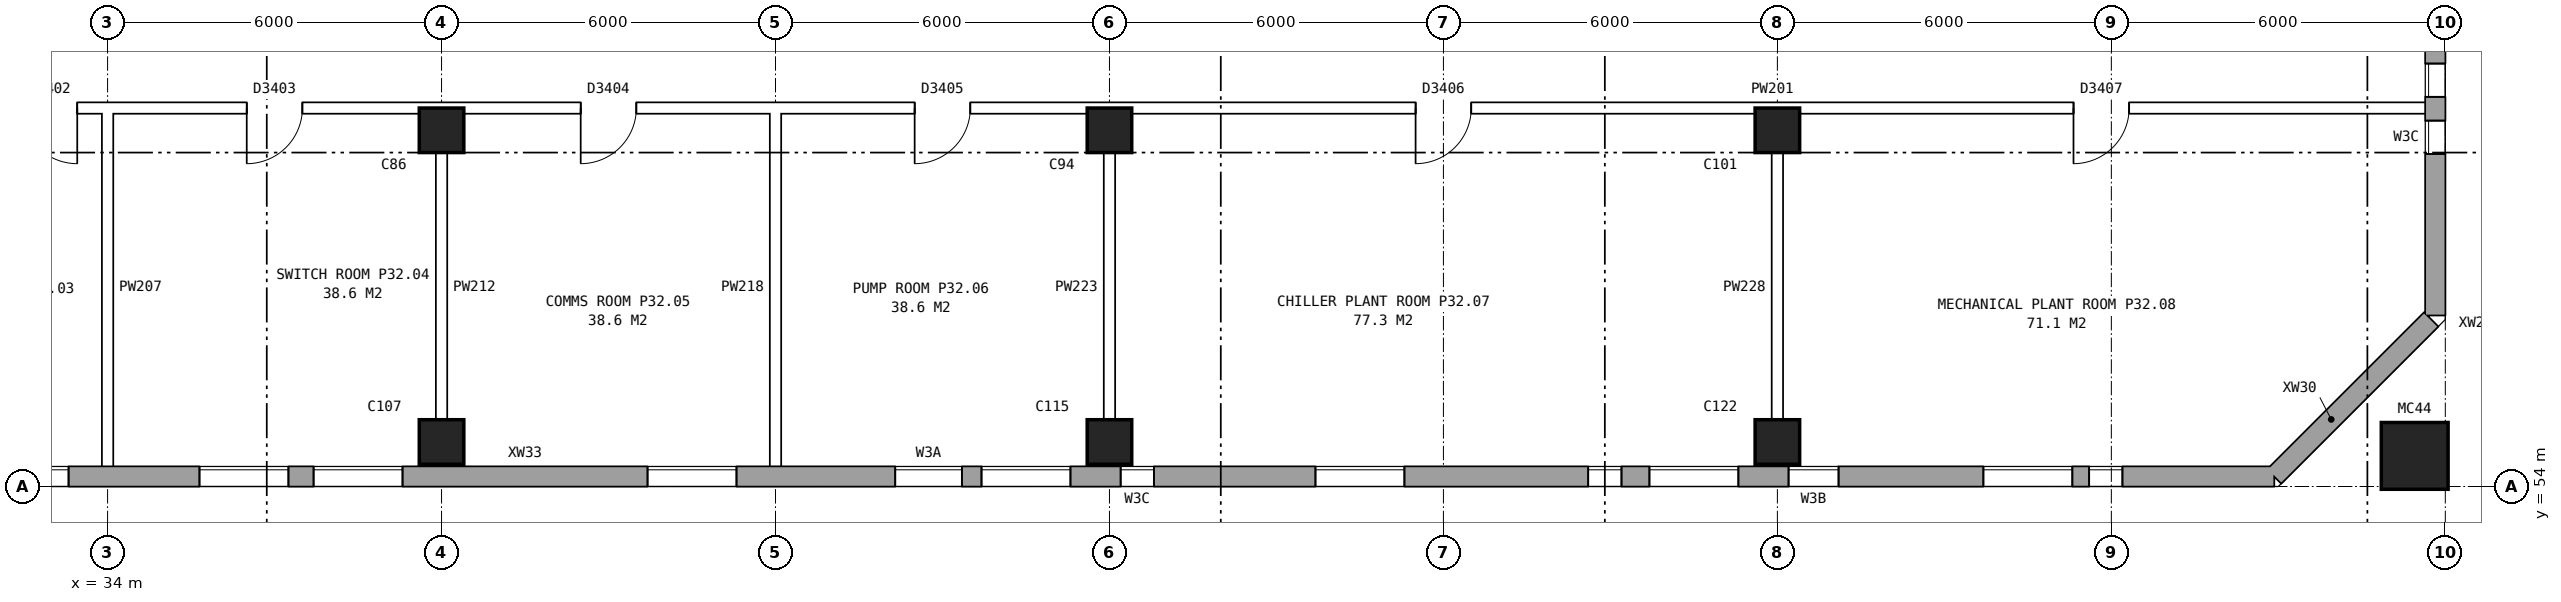
"""IFC4 building model, lengths in metres.
Left out: names, types, materials, properties, quantities, classifications, styles, units other than length and angle.
Written with IfcOpenShell. Run it as: python <this file> out.ifc"""

import sys

from ifc_helpers import new_model, si_unit, direction, frame, frame_2d, origin, origin_2d, place, context, subcontext, project, spatial, rectangle, hollow_rectangle, extrude, element, fill, save


model = new_model("IFC4")
c1 = context("Model", 3, precision=1e-05, world=origin(), true_north=direction((0.0, 1.0)))
c2 = subcontext(c1, "Body", "Model", "MODEL_VIEW")
j1 = project(units=[si_unit("LENGTHUNIT", "METRE"), si_unit("PLANEANGLEUNIT", "RADIAN")], contexts=[c1])
p1 = place(None, origin())
s1 = spatial("IfcSite", under=j1, at=p1, CompositionType="ELEMENT")
p2 = place(p1, origin())
s2 = spatial("IfcBuilding", under=s1, at=p2, CompositionType="ELEMENT")
p3 = place(p2, frame((0.0, 0.0, 115.0)))
s3 = spatial("IfcBuildingStorey", under=s2, at=p3, CompositionType="ELEMENT", Elevation=115.0)
for number, where, z_axis, x_axis in (
    (1, (40.0, 54.8, 0.0), (0.0, 0.0, 1.0), (1.0, 0.0, 0.0)),
    (2, (40.0, 60.4, 0.0), (0.0, 0.0, 1.0), (1.0, 0.0, 0.0)),
    (3, (52.0, 54.8, 0.0), (0.0, 0.0, 1.0), (1.0, 0.0, 0.0)),
    (4, (52.0, 60.4, 0.0), (0.0, 0.0, 1.0), (1.0, 0.0, 0.0)),
    (5, (64.0, 54.8, 0.0), (0.0, 0.0, 1.0), (1.0, 0.0, 0.0)),
    (6, (64.0, 60.4, 0.0), (0.0, 0.0, 1.0), (1.0, 0.0, 0.0)),
):
    element("IfcColumn", number, at=place(p3, frame(where, z_axis=z_axis, x_axis=x_axis)), inside=s3, PredefinedType="COLUMN", context=c2, shape_type="SweptSolid", body=[
        extrude(rectangle(XDim=0.8, YDim=0.8, at=origin_2d()), origin(), (0.0, 0.0, 1.0), 4.2),
    ])
p4 = place(p3, frame((75.45, 54.55, 0.0), z_axis=(0.0, 0.0, 1.0), x_axis=(1.0, 0.0, 0.0)))
e7 = element("IfcColumn", 7, at=p4, inside=s3, PredefinedType="COLUMN", context=c2, shape_type="SweptSolid", body=[
    extrude(hollow_rectangle(XDim=1.2, YDim=1.2, WallThickness=0.065, at=origin_2d()), origin(), (0.0, 0.0, 1.0), 4.5),
])
p5 = place(p3, frame((29.825, 54.18, 0.0), z_axis=(0.0, 0.0, 1.0), x_axis=(1.0, 0.0, 0.0)))
e8 = element("IfcWall", 8, at=p5, inside=s3, PredefinedType="STANDARD", context=c2, shape_type="SweptSolid", body=[
    extrude(rectangle(XDim=43.101, YDim=0.36, at=frame_2d((21.55, 0.0))), origin(), (0.0, 0.0, 1.0), 4.2),
])
p6 = place(p5, frame((1.875, 0.0, 1.5)))
e9 = element("IfcOpeningElement", 9, at=p6, cuts=e8, PredefinedType="OPENING", context=c2, shape_type="SweptSolid", body=[
    extrude(rectangle(XDim=1.6, YDim=1.2, at=frame_2d((0.8, 0.6))), frame((0.0, 0.19, 0.0), z_axis=(0.0, -1.0, 0.0), x_axis=(1.0, 0.0, 0.0)), (0.0, 0.0, 1.0), 0.38),
])
p7 = place(p5, frame((5.825, 0.0, 1.5)))
e10 = element("IfcOpeningElement", 10, at=p7, cuts=e8, PredefinedType="OPENING", context=c2, shape_type="SweptSolid", body=[
    extrude(rectangle(XDim=1.6, YDim=1.2, at=frame_2d((0.8, 0.6))), frame((0.0, 0.19, 0.0), z_axis=(0.0, -1.0, 0.0), x_axis=(1.0, 0.0, 0.0)), (0.0, 0.0, 1.0), 0.38),
])
p8 = place(p5, frame((7.875, 0.0, 1.5)))
e11 = element("IfcOpeningElement", 11, at=p8, cuts=e8, PredefinedType="OPENING", context=c2, shape_type="SweptSolid", body=[
    extrude(rectangle(XDim=1.6, YDim=1.2, at=frame_2d((0.8, 0.6))), frame((0.0, 0.19, 0.0), z_axis=(0.0, -1.0, 0.0), x_axis=(1.0, 0.0, 0.0)), (0.0, 0.0, 1.0), 0.38),
])
p9 = place(p5, frame((13.875, 0.0, 1.5)))
e12 = element("IfcOpeningElement", 12, at=p9, cuts=e8, PredefinedType="OPENING", context=c2, shape_type="SweptSolid", body=[
    extrude(rectangle(XDim=1.6, YDim=1.2, at=frame_2d((0.8, 0.6))), frame((0.0, 0.19, 0.0), z_axis=(0.0, -1.0, 0.0), x_axis=(1.0, 0.0, 0.0)), (0.0, 0.0, 1.0), 0.38),
])
p10 = place(p5, frame((18.325, 0.0, 1.5)))
e13 = element("IfcOpeningElement", 13, at=p10, cuts=e8, PredefinedType="OPENING", context=c2, shape_type="SweptSolid", body=[
    extrude(rectangle(XDim=1.2, YDim=1.2, at=frame_2d((0.6, 0.6))), frame((0.0, 0.19, 0.0), z_axis=(0.0, -1.0, 0.0), x_axis=(1.0, 0.0, 0.0)), (0.0, 0.0, 1.0), 0.38),
])
p11 = place(p5, frame((19.875, 0.0, 1.5)))
e14 = element("IfcOpeningElement", 14, at=p11, cuts=e8, PredefinedType="OPENING", context=c2, shape_type="SweptSolid", body=[
    extrude(rectangle(XDim=1.6, YDim=1.2, at=frame_2d((0.8, 0.6))), frame((0.0, 0.19, 0.0), z_axis=(0.0, -1.0, 0.0), x_axis=(1.0, 0.0, 0.0)), (0.0, 0.0, 1.0), 0.38),
])
p12 = place(p5, frame((22.375, 0.0, 1.5)))
e15 = element("IfcOpeningElement", 15, at=p12, cuts=e8, PredefinedType="OPENING", context=c2, shape_type="SweptSolid", body=[
    extrude(rectangle(XDim=0.6, YDim=1.2, at=frame_2d((0.3, 0.6))), frame((0.0, 0.19, 0.0), z_axis=(0.0, -1.0, 0.0), x_axis=(1.0, 0.0, 0.0)), (0.0, 0.0, 1.0), 0.38),
])
p13 = place(p5, frame((25.875, 0.0, 1.5)))
e16 = element("IfcOpeningElement", 16, at=p13, cuts=e8, PredefinedType="OPENING", context=c2, shape_type="SweptSolid", body=[
    extrude(rectangle(XDim=1.6, YDim=1.2, at=frame_2d((0.8, 0.6))), frame((0.0, 0.19, 0.0), z_axis=(0.0, -1.0, 0.0), x_axis=(1.0, 0.0, 0.0)), (0.0, 0.0, 1.0), 0.38),
])
p14 = place(p5, frame((30.775, 0.0, 1.5)))
e17 = element("IfcOpeningElement", 17, at=p14, cuts=e8, PredefinedType="OPENING", context=c2, shape_type="SweptSolid", body=[
    extrude(rectangle(XDim=0.6, YDim=1.2, at=frame_2d((0.3, 0.6))), frame((0.0, 0.19, 0.0), z_axis=(0.0, -1.0, 0.0), x_axis=(1.0, 0.0, 0.0)), (0.0, 0.0, 1.0), 0.38),
])
p15 = place(p5, frame((31.875, 0.0, 1.5)))
e18 = element("IfcOpeningElement", 18, at=p15, cuts=e8, PredefinedType="OPENING", context=c2, shape_type="SweptSolid", body=[
    extrude(rectangle(XDim=1.6, YDim=1.2, at=frame_2d((0.8, 0.6))), frame((0.0, 0.19, 0.0), z_axis=(0.0, -1.0, 0.0), x_axis=(1.0, 0.0, 0.0)), (0.0, 0.0, 1.0), 0.38),
])
p16 = place(p5, frame((34.375, 0.0, 1.5)))
e19 = element("IfcOpeningElement", 19, at=p16, cuts=e8, PredefinedType="OPENING", context=c2, shape_type="SweptSolid", body=[
    extrude(rectangle(XDim=0.9, YDim=1.2, at=frame_2d((0.45, 0.6))), frame((0.0, 0.19, 0.0), z_axis=(0.0, -1.0, 0.0), x_axis=(1.0, 0.0, 0.0)), (0.0, 0.0, 1.0), 0.38),
])
p17 = place(p5, frame((37.875, 0.0, 1.5)))
e20 = element("IfcOpeningElement", 20, at=p17, cuts=e8, PredefinedType="OPENING", context=c2, shape_type="SweptSolid", body=[
    extrude(rectangle(XDim=1.6, YDim=1.2, at=frame_2d((0.8, 0.6))), frame((0.0, 0.19, 0.0), z_axis=(0.0, -1.0, 0.0), x_axis=(1.0, 0.0, 0.0)), (0.0, 0.0, 1.0), 0.38),
])
p18 = place(p5, frame((39.775, 0.0, 1.5)))
e21 = element("IfcOpeningElement", 21, at=p18, cuts=e8, PredefinedType="OPENING", context=c2, shape_type="SweptSolid", body=[
    extrude(rectangle(XDim=0.6, YDim=1.2, at=frame_2d((0.3, 0.6))), frame((0.0, 0.19, 0.0), z_axis=(0.0, -1.0, 0.0), x_axis=(1.0, 0.0, 0.0)), (0.0, 0.0, 1.0), 0.38),
])
p19 = place(p3, frame((72.925, 54.18, 0.0), z_axis=(0.0, 0.0, 1.0), x_axis=(0.707148882153, 0.707064677713, 0.0)))
e22 = element("IfcWall", 22, at=p19, inside=s3, PredefinedType="STANDARD", context=c2, shape_type="SweptSolid", body=[
    extrude(rectangle(XDim=2.899, YDim=0.36, at=frame_2d((1.45, 0.0))), origin(), (0.0, 0.0, 1.0), 4.2),
])
p20 = place(p3, frame((74.976, 56.23, 0.953), z_axis=(0.0, 0.0, 1.0), x_axis=(0.706994764273, 0.707218780358, 0.0)))
e23 = element("IfcWall", 23, at=p20, inside=s3, PredefinedType="STANDARD", context=c2, shape_type="SweptSolid", body=[
    extrude(rectangle(XDim=1.09, YDim=0.36, at=frame_2d((0.545, 0.0))), origin(), (0.0, 0.0, 1.0), 2.444),
])
p21 = place(p3, frame((75.82, 57.075, 0.0), z_axis=(0.0, 0.0, 1.0), x_axis=(0.0, 1.0, 0.0)))
e24 = element("IfcWall", 24, at=p21, inside=s3, PredefinedType="STANDARD", context=c2, shape_type="SweptSolid", body=[
    extrude(rectangle(XDim=25.851, YDim=0.36, at=frame_2d((12.925, 0.0))), origin(), (0.0, 0.0, 1.0), 4.2),
])
p22 = place(p21, frame((2.9, 0.0, 1.5)))
e25 = element("IfcOpeningElement", 25, at=p22, cuts=e24, PredefinedType="OPENING", context=c2, shape_type="SweptSolid", body=[
    extrude(rectangle(XDim=0.6, YDim=1.2, at=frame_2d((0.3, 0.6))), frame((0.0, 0.19, 0.0), z_axis=(0.0, -1.0, 0.0), x_axis=(1.0, 0.0, 0.0)), (0.0, 0.0, 1.0), 0.38),
])
p23 = place(p21, frame((3.925, 0.0, 1.5)))
e26 = element("IfcOpeningElement", 26, at=p23, cuts=e24, PredefinedType="OPENING", context=c2, shape_type="SweptSolid", body=[
    extrude(rectangle(XDim=0.6, YDim=1.2, at=frame_2d((0.3, 0.6))), frame((0.0, 0.19, 0.0), z_axis=(0.0, -1.0, 0.0), x_axis=(1.0, 0.0, 0.0)), (0.0, 0.0, 1.0), 0.38),
])
p24 = place(p21, frame((19.625, 0.0, 1.5)))
e27 = element("IfcOpeningElement", 27, at=p24, cuts=e24, PredefinedType="OPENING", context=c2, shape_type="SweptSolid", body=[
    extrude(rectangle(XDim=1.6, YDim=1.2, at=frame_2d((0.8, 0.6))), frame((0.0, 0.19, 0.0), z_axis=(0.0, -1.0, 0.0), x_axis=(1.0, 0.0, 0.0)), (0.0, 0.0, 1.0), 0.38),
])
p25 = place(p21, frame((22.125, 0.0, 1.5)))
e28 = element("IfcOpeningElement", 28, at=p25, cuts=e24, PredefinedType="OPENING", context=c2, shape_type="SweptSolid", body=[
    extrude(rectangle(XDim=0.6, YDim=1.2, at=frame_2d((0.3, 0.6))), frame((0.0, 0.19, 0.0), z_axis=(0.0, -1.0, 0.0), x_axis=(1.0, 0.0, 0.0)), (0.0, 0.0, 1.0), 0.38),
])
p26 = place(p3, frame((26.99, 60.8, 0.0), z_axis=(0.0, 0.0, 1.0), x_axis=(1.0, 0.0, 0.0)))
e29 = element("IfcWall", 29, at=p26, inside=s3, PredefinedType="PARTITIONING", context=c2, shape_type="SweptSolid", body=[
    extrude(rectangle(XDim=48.77, YDim=0.2, at=frame_2d((24.385, 0.0))), origin(), (0.0, 0.0, 1.0), 4.2),
])
p27 = place(p26, frame((5.465, 0.0, 0.0)))
e30 = element("IfcOpeningElement", 30, at=p27, cuts=e29, PredefinedType="OPENING", context=c2, shape_type="SweptSolid", body=[
    extrude(rectangle(XDim=1.0, YDim=2.1, at=frame_2d((0.5, 1.05))), frame((0.0, 0.11, 0.0), z_axis=(0.0, -1.0, 0.0), x_axis=(1.0, 0.0, 0.0)), (0.0, 0.0, 1.0), 0.22),
])
p28 = place(p26, frame((9.51, 0.0, 0.0)))
e31 = element("IfcOpeningElement", 31, at=p28, cuts=e29, PredefinedType="OPENING", context=c2, shape_type="SweptSolid", body=[
    extrude(rectangle(XDim=1.0, YDim=2.1, at=frame_2d((0.5, 1.05))), frame((0.0, 0.11, 0.0), z_axis=(0.0, -1.0, 0.0), x_axis=(1.0, 0.0, 0.0)), (0.0, 0.0, 1.0), 0.22),
])
p29 = place(p26, frame((15.51, 0.0, 0.0)))
e32 = element("IfcOpeningElement", 32, at=p29, cuts=e29, PredefinedType="OPENING", context=c2, shape_type="SweptSolid", body=[
    extrude(rectangle(XDim=1.0, YDim=2.1, at=frame_2d((0.5, 1.05))), frame((0.0, 0.11, 0.0), z_axis=(0.0, -1.0, 0.0), x_axis=(1.0, 0.0, 0.0)), (0.0, 0.0, 1.0), 0.22),
])
p30 = place(p26, frame((21.51, 0.0, 0.0)))
e33 = element("IfcOpeningElement", 33, at=p30, cuts=e29, PredefinedType="OPENING", context=c2, shape_type="SweptSolid", body=[
    extrude(rectangle(XDim=1.0, YDim=2.1, at=frame_2d((0.5, 1.05))), frame((0.0, 0.11, 0.0), z_axis=(0.0, -1.0, 0.0), x_axis=(1.0, 0.0, 0.0)), (0.0, 0.0, 1.0), 0.22),
])
p31 = place(p26, frame((30.51, 0.0, 0.0)))
e34 = element("IfcOpeningElement", 34, at=p31, cuts=e29, PredefinedType="OPENING", context=c2, shape_type="SweptSolid", body=[
    extrude(rectangle(XDim=1.0, YDim=2.1, at=frame_2d((0.5, 1.05))), frame((0.0, 0.11, 0.0), z_axis=(0.0, -1.0, 0.0), x_axis=(1.0, 0.0, 0.0)), (0.0, 0.0, 1.0), 0.22),
])
p32 = place(p26, frame((42.33, 0.0, 0.0)))
e35 = element("IfcOpeningElement", 35, at=p32, cuts=e29, PredefinedType="OPENING", context=c2, shape_type="SweptSolid", body=[
    extrude(rectangle(XDim=1.0, YDim=2.1, at=frame_2d((0.5, 1.05))), frame((0.0, 0.11, 0.0), z_axis=(0.0, -1.0, 0.0), x_axis=(1.0, 0.0, 0.0)), (0.0, 0.0, 1.0), 0.22),
])
for number, where, z_axis, x_axis in (
    (36, (34.0, 54.24, 0.0), (0.0, 0.0, 1.0), (0.0, 1.0, 0.0)),
    (37, (40.0, 54.24, 0.0), (0.0, 0.0, 1.0), (0.0, 1.0, 0.0)),
    (38, (46.0, 54.24, 0.0), (0.0, 0.0, 1.0), (0.0, 1.0, 0.0)),
    (39, (52.0, 54.24, 0.0), (0.0, 0.0, 1.0), (0.0, 1.0, 0.0)),
    (40, (64.0, 54.24, 0.0), (0.0, 0.0, 1.0), (0.0, 1.0, 0.0)),
):
    element("IfcWall", number, at=place(p3, frame(where, z_axis=z_axis, x_axis=x_axis)), inside=s3, PredefinedType="PARTITIONING", context=c2, shape_type="SweptSolid", body=[
        extrude(rectangle(XDim=6.66, YDim=0.2, at=frame_2d((3.33, 0.0))), origin(), (0.0, 0.0, 1.0), 4.2),
    ])
p33 = place(p6, origin())
e41 = element("IfcWindow", 41, at=p33, inside=s3, PartitioningType="DOUBLE_PANEL_HORIZONTAL", PredefinedType="WINDOW", context=c2, shape_type="SweptSolid", body=[
    extrude(rectangle(XDim=1.6, YDim=1.2, at=frame_2d((0.8, 0.6))), frame((0.0, 0.15, 0.0), z_axis=(0.0, -1.0, 0.0), x_axis=(1.0, 0.0, 0.0)), (0.0, 0.0, 1.0), 0.06),
])
fill(e9, e41)
p34 = place(p7, origin())
e42 = element("IfcWindow", 42, at=p34, inside=s3, PartitioningType="DOUBLE_PANEL_HORIZONTAL", PredefinedType="WINDOW", context=c2, shape_type="SweptSolid", body=[
    extrude(rectangle(XDim=1.6, YDim=1.2, at=frame_2d((0.8, 0.6))), frame((0.0, 0.15, 0.0), z_axis=(0.0, -1.0, 0.0), x_axis=(1.0, 0.0, 0.0)), (0.0, 0.0, 1.0), 0.06),
])
fill(e10, e42)
p35 = place(p8, origin())
e43 = element("IfcWindow", 43, at=p35, inside=s3, PartitioningType="DOUBLE_PANEL_HORIZONTAL", PredefinedType="WINDOW", context=c2, shape_type="SweptSolid", body=[
    extrude(rectangle(XDim=1.6, YDim=1.2, at=frame_2d((0.8, 0.6))), frame((0.0, 0.15, 0.0), z_axis=(0.0, -1.0, 0.0), x_axis=(1.0, 0.0, 0.0)), (0.0, 0.0, 1.0), 0.06),
])
fill(e11, e43)
p36 = place(p9, origin())
e44 = element("IfcWindow", 44, at=p36, inside=s3, PartitioningType="DOUBLE_PANEL_HORIZONTAL", PredefinedType="WINDOW", context=c2, shape_type="SweptSolid", body=[
    extrude(rectangle(XDim=1.6, YDim=1.2, at=frame_2d((0.8, 0.6))), frame((0.0, 0.15, 0.0), z_axis=(0.0, -1.0, 0.0), x_axis=(1.0, 0.0, 0.0)), (0.0, 0.0, 1.0), 0.06),
])
fill(e12, e44)
p37 = place(p10, origin())
e45 = element("IfcWindow", 45, at=p37, inside=s3, PartitioningType="DOUBLE_PANEL_HORIZONTAL", PredefinedType="WINDOW", context=c2, shape_type="SweptSolid", body=[
    extrude(rectangle(XDim=1.2, YDim=1.2, at=frame_2d((0.6, 0.6))), frame((0.0, 0.15, 0.0), z_axis=(0.0, -1.0, 0.0), x_axis=(1.0, 0.0, 0.0)), (0.0, 0.0, 1.0), 0.06),
])
fill(e13, e45)
p38 = place(p11, origin())
e46 = element("IfcWindow", 46, at=p38, inside=s3, PartitioningType="DOUBLE_PANEL_HORIZONTAL", PredefinedType="WINDOW", context=c2, shape_type="SweptSolid", body=[
    extrude(rectangle(XDim=1.6, YDim=1.2, at=frame_2d((0.8, 0.6))), frame((0.0, 0.15, 0.0), z_axis=(0.0, -1.0, 0.0), x_axis=(1.0, 0.0, 0.0)), (0.0, 0.0, 1.0), 0.06),
])
fill(e14, e46)
p39 = place(p12, origin())
e47 = element("IfcWindow", 47, at=p39, inside=s3, PartitioningType="DOUBLE_PANEL_HORIZONTAL", PredefinedType="WINDOW", context=c2, shape_type="SweptSolid", body=[
    extrude(rectangle(XDim=0.6, YDim=1.2, at=frame_2d((0.3, 0.6))), frame((0.0, 0.15, 0.0), z_axis=(0.0, -1.0, 0.0), x_axis=(1.0, 0.0, 0.0)), (0.0, 0.0, 1.0), 0.06),
])
fill(e15, e47)
p40 = place(p13, origin())
e48 = element("IfcWindow", 48, at=p40, inside=s3, PartitioningType="DOUBLE_PANEL_HORIZONTAL", PredefinedType="WINDOW", context=c2, shape_type="SweptSolid", body=[
    extrude(rectangle(XDim=1.6, YDim=1.2, at=frame_2d((0.8, 0.6))), frame((0.0, 0.15, 0.0), z_axis=(0.0, -1.0, 0.0), x_axis=(1.0, 0.0, 0.0)), (0.0, 0.0, 1.0), 0.06),
])
fill(e16, e48)
p41 = place(p14, origin())
e49 = element("IfcWindow", 49, at=p41, inside=s3, PartitioningType="DOUBLE_PANEL_HORIZONTAL", PredefinedType="WINDOW", context=c2, shape_type="SweptSolid", body=[
    extrude(rectangle(XDim=0.6, YDim=1.2, at=frame_2d((0.3, 0.6))), frame((0.0, 0.15, 0.0), z_axis=(0.0, -1.0, 0.0), x_axis=(1.0, 0.0, 0.0)), (0.0, 0.0, 1.0), 0.06),
])
fill(e17, e49)
p42 = place(p15, origin())
e50 = element("IfcWindow", 50, at=p42, inside=s3, PartitioningType="DOUBLE_PANEL_HORIZONTAL", PredefinedType="WINDOW", context=c2, shape_type="SweptSolid", body=[
    extrude(rectangle(XDim=1.6, YDim=1.2, at=frame_2d((0.8, 0.6))), frame((0.0, 0.15, 0.0), z_axis=(0.0, -1.0, 0.0), x_axis=(1.0, 0.0, 0.0)), (0.0, 0.0, 1.0), 0.06),
])
fill(e18, e50)
p43 = place(p16, origin())
e51 = element("IfcWindow", 51, at=p43, inside=s3, PartitioningType="DOUBLE_PANEL_HORIZONTAL", PredefinedType="WINDOW", context=c2, shape_type="SweptSolid", body=[
    extrude(rectangle(XDim=0.9, YDim=1.2, at=frame_2d((0.45, 0.6))), frame((0.0, 0.15, 0.0), z_axis=(0.0, -1.0, 0.0), x_axis=(1.0, 0.0, 0.0)), (0.0, 0.0, 1.0), 0.06),
])
fill(e19, e51)
p44 = place(p17, origin())
e52 = element("IfcWindow", 52, at=p44, inside=s3, PartitioningType="DOUBLE_PANEL_HORIZONTAL", PredefinedType="WINDOW", context=c2, shape_type="SweptSolid", body=[
    extrude(rectangle(XDim=1.6, YDim=1.2, at=frame_2d((0.8, 0.6))), frame((0.0, 0.15, 0.0), z_axis=(0.0, -1.0, 0.0), x_axis=(1.0, 0.0, 0.0)), (0.0, 0.0, 1.0), 0.06),
])
fill(e20, e52)
p45 = place(p18, origin())
e53 = element("IfcWindow", 53, at=p45, inside=s3, PartitioningType="DOUBLE_PANEL_HORIZONTAL", PredefinedType="WINDOW", context=c2, shape_type="SweptSolid", body=[
    extrude(rectangle(XDim=0.6, YDim=1.2, at=frame_2d((0.3, 0.6))), frame((0.0, 0.15, 0.0), z_axis=(0.0, -1.0, 0.0), x_axis=(1.0, 0.0, 0.0)), (0.0, 0.0, 1.0), 0.06),
])
fill(e21, e53)
p46 = place(p22, origin())
e54 = element("IfcWindow", 54, at=p46, inside=s3, PartitioningType="DOUBLE_PANEL_HORIZONTAL", PredefinedType="WINDOW", context=c2, shape_type="SweptSolid", body=[
    extrude(rectangle(XDim=0.6, YDim=1.2, at=frame_2d((0.3, 0.6))), frame((0.0, 0.15, 0.0), z_axis=(0.0, -1.0, 0.0), x_axis=(1.0, 0.0, 0.0)), (0.0, 0.0, 1.0), 0.06),
])
fill(e25, e54)
p47 = place(p23, origin())
e55 = element("IfcWindow", 55, at=p47, inside=s3, PartitioningType="DOUBLE_PANEL_HORIZONTAL", PredefinedType="WINDOW", context=c2, shape_type="SweptSolid", body=[
    extrude(rectangle(XDim=0.6, YDim=1.2, at=frame_2d((0.3, 0.6))), frame((0.0, 0.15, 0.0), z_axis=(0.0, -1.0, 0.0), x_axis=(1.0, 0.0, 0.0)), (0.0, 0.0, 1.0), 0.06),
])
fill(e26, e55)
p48 = place(p27, frame((1.0, 0.0, 0.0), z_axis=(0.0, 0.0, 1.0), x_axis=(-1.0, 0.0, 0.0)))
e56 = element("IfcDoor", 56, at=p48, inside=s3, OperationType="SINGLE_SWING_LEFT", PredefinedType="DOOR", context=c2, shape_type="SweptSolid", body=[
    extrude(rectangle(XDim=1.0, YDim=2.1, at=frame_2d((0.5, 1.05))), frame((0.0, 0.025, 0.0), z_axis=(0.0, -1.0, 0.0), x_axis=(1.0, 0.0, 0.0)), (0.0, 0.0, 1.0), 0.05),
])
fill(e30, e56)
p49 = place(p28, frame((1.0, 0.0, 0.0), z_axis=(0.0, 0.0, 1.0), x_axis=(-1.0, 0.0, 0.0)))
e57 = element("IfcDoor", 57, at=p49, inside=s3, OperationType="SINGLE_SWING_RIGHT", PredefinedType="DOOR", context=c2, shape_type="SweptSolid", body=[
    extrude(rectangle(XDim=1.0, YDim=2.1, at=frame_2d((0.5, 1.05))), frame((0.0, 0.025, 0.0), z_axis=(0.0, -1.0, 0.0), x_axis=(1.0, 0.0, 0.0)), (0.0, 0.0, 1.0), 0.05),
])
fill(e31, e57)
p50 = place(p29, frame((1.0, 0.0, 0.0), z_axis=(0.0, 0.0, 1.0), x_axis=(-1.0, 0.0, 0.0)))
e58 = element("IfcDoor", 58, at=p50, inside=s3, OperationType="SINGLE_SWING_RIGHT", PredefinedType="DOOR", context=c2, shape_type="SweptSolid", body=[
    extrude(rectangle(XDim=1.0, YDim=2.1, at=frame_2d((0.5, 1.05))), frame((0.0, 0.025, 0.0), z_axis=(0.0, -1.0, 0.0), x_axis=(1.0, 0.0, 0.0)), (0.0, 0.0, 1.0), 0.05),
])
fill(e32, e58)
p51 = place(p30, frame((1.0, 0.0, 0.0), z_axis=(0.0, 0.0, 1.0), x_axis=(-1.0, 0.0, 0.0)))
e59 = element("IfcDoor", 59, at=p51, inside=s3, OperationType="SINGLE_SWING_RIGHT", PredefinedType="DOOR", context=c2, shape_type="SweptSolid", body=[
    extrude(rectangle(XDim=1.0, YDim=2.1, at=frame_2d((0.5, 1.05))), frame((0.0, 0.025, 0.0), z_axis=(0.0, -1.0, 0.0), x_axis=(1.0, 0.0, 0.0)), (0.0, 0.0, 1.0), 0.05),
])
fill(e33, e59)
p52 = place(p31, frame((1.0, 0.0, 0.0), z_axis=(0.0, 0.0, 1.0), x_axis=(-1.0, 0.0, 0.0)))
e60 = element("IfcDoor", 60, at=p52, inside=s3, OperationType="SINGLE_SWING_RIGHT", PredefinedType="DOOR", context=c2, shape_type="SweptSolid", body=[
    extrude(rectangle(XDim=1.0, YDim=2.1, at=frame_2d((0.5, 1.05))), frame((0.0, 0.025, 0.0), z_axis=(0.0, -1.0, 0.0), x_axis=(1.0, 0.0, 0.0)), (0.0, 0.0, 1.0), 0.05),
])
fill(e34, e60)
p53 = place(p32, frame((1.0, 0.0, 0.0), z_axis=(0.0, 0.0, 1.0), x_axis=(-1.0, 0.0, 0.0)))
e61 = element("IfcDoor", 61, at=p53, inside=s3, OperationType="SINGLE_SWING_RIGHT", PredefinedType="DOOR", context=c2, shape_type="SweptSolid", body=[
    extrude(rectangle(XDim=1.0, YDim=2.1, at=frame_2d((0.5, 1.05))), frame((0.0, 0.025, 0.0), z_axis=(0.0, -1.0, 0.0), x_axis=(1.0, 0.0, 0.0)), (0.0, 0.0, 1.0), 0.05),
])
fill(e35, e61)
save(model, sys.argv[1])
